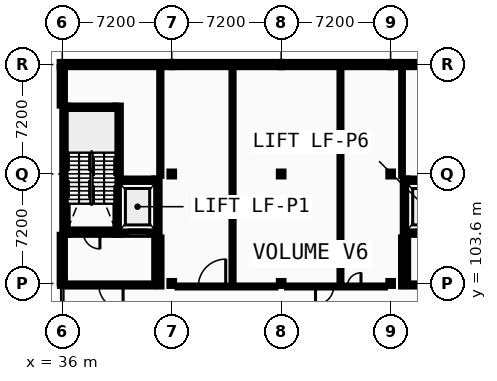
"""IFC4 building model, lengths in metres.
Left out: names, types, materials, properties, quantities, classifications, styles, units other than length and angle.
Written with IfcOpenShell. Run it as: python <this file> out.ifc"""

import sys

from ifc_helpers import new_model, si_unit, direction, frame, frame_2d, origin, origin_2d, place, context, subcontext, project, spatial, rectangle, i_section, extrude, element, fill, save


model = new_model("IFC4")
c1 = context("Model", 3, precision=1e-05, world=origin(), true_north=direction((0.0, 1.0)))
c2 = subcontext(c1, "Body", "Model", "MODEL_VIEW")
j1 = project(units=[si_unit("LENGTHUNIT", "METRE"), si_unit("PLANEANGLEUNIT", "RADIAN")], contexts=[c1])
p1 = place(None, origin())
s1 = spatial("IfcSite", under=j1, at=p1, CompositionType="ELEMENT")
p2 = place(p1, origin())
s2 = spatial("IfcBuilding", under=s1, at=p2, CompositionType="ELEMENT")
p3 = place(p2, frame((0.0, 0.0, 18.4)))
s3 = spatial("IfcBuildingStorey", under=s2, at=p3, CompositionType="ELEMENT", Elevation=18.4)
for number, where, z_axis, x_axis in (
    (1, (36.0, 103.6, 0.0), (0.0, 0.0, 1.0), (1.0, 0.0, 0.0)),
    (2, (36.0, 118.0, 0.0), (0.0, 0.0, 1.0), (1.0, 0.0, 0.0)),
    (3, (43.2, 103.6, 0.0), (0.0, 0.0, 1.0), (1.0, 0.0, 0.0)),
    (4, (43.2, 110.8, 0.0), (0.0, 0.0, 1.0), (1.0, 0.0, 0.0)),
    (5, (43.2, 118.0, 0.0), (0.0, 0.0, 1.0), (1.0, 0.0, 0.0)),
    (6, (50.4, 103.6, 0.0), (0.0, 0.0, 1.0), (1.0, 0.0, 0.0)),
    (7, (50.4, 110.8, 0.0), (0.0, 0.0, 1.0), (1.0, 0.0, 0.0)),
    (8, (50.4, 118.0, 0.0), (0.0, 0.0, 1.0), (1.0, 0.0, 0.0)),
    (9, (57.6, 103.6, 0.0), (0.0, 0.0, 1.0), (1.0, 0.0, 0.0)),
    (10, (57.6, 110.8, 0.0), (0.0, 0.0, 1.0), (1.0, 0.0, 0.0)),
    (11, (57.6, 118.0, 0.0), (0.0, 0.0, 1.0), (1.0, 0.0, 0.0)),
):
    element("IfcColumn", number, at=place(p3, frame(where, z_axis=z_axis, x_axis=x_axis)), inside=s3, PredefinedType="COLUMN", context=c2, shape_type="SweptSolid", body=[
        extrude(i_section(OverallWidth=0.3, OverallDepth=0.32, WebThickness=0.011, FlangeThickness=0.021, FilletRadius=0.027, at=origin_2d()), origin(), (0.0, 0.0, 1.0), 4.4),
    ])
p4 = place(p3, frame((43.2, 118.0, 0.0), z_axis=(0.0, 0.0, 1.0), x_axis=(-1.0, 0.0, 0.0)))
e12 = element("IfcWall", 12, at=p4, inside=s3, PredefinedType="STANDARD", context=c2, shape_type="SweptSolid", body=[
    extrude(rectangle(XDim=7.37, YDim=0.34, at=frame_2d((3.685, 0.0))), origin(), (0.0, 0.0, 1.0), 3.95),
])
p5 = place(p4, frame((1.662, 0.0, 0.95)))
e13 = element("IfcOpeningElement", 13, at=p5, cuts=e12, PredefinedType="OPENING", context=c2, shape_type="SweptSolid", body=[
    extrude(rectangle(XDim=1.098, YDim=1.26, at=frame_2d((0.549, 0.63))), frame((0.0, 0.18, 0.0), z_axis=(0.0, -1.0, 0.0), x_axis=(1.0, 0.0, 0.0)), (0.0, 0.0, 1.0), 0.36),
])
p6 = place(p4, frame((4.61, 0.0, 0.95)))
e14 = element("IfcOpeningElement", 14, at=p6, cuts=e12, PredefinedType="OPENING", context=c2, shape_type="SweptSolid", body=[
    extrude(rectangle(XDim=1.098, YDim=1.26, at=frame_2d((0.549, 0.63))), frame((0.0, 0.18, 0.0), z_axis=(0.0, -1.0, 0.0), x_axis=(1.0, 0.0, 0.0)), (0.0, 0.0, 1.0), 0.36),
])
p7 = place(p3, frame((50.4, 118.0, 0.0), z_axis=(0.0, 0.0, 1.0), x_axis=(-1.0, 0.0, 0.0)))
e15 = element("IfcWall", 15, at=p7, inside=s3, PredefinedType="STANDARD", context=c2, shape_type="SweptSolid", body=[
    extrude(rectangle(XDim=7.2, YDim=0.34, at=frame_2d((3.6, 0.0))), origin(), (0.0, 0.0, 1.0), 3.95),
])
p8 = place(p7, frame((1.594, 0.0, 0.95)))
e16 = element("IfcOpeningElement", 16, at=p8, cuts=e15, PredefinedType="OPENING", context=c2, shape_type="SweptSolid", body=[
    extrude(rectangle(XDim=1.132, YDim=1.26, at=frame_2d((0.566, 0.63))), frame((0.0, 0.18, 0.0), z_axis=(0.0, -1.0, 0.0), x_axis=(1.0, 0.0, 0.0)), (0.0, 0.0, 1.0), 0.36),
])
p9 = place(p3, frame((57.6, 118.0, 0.0), z_axis=(0.0, 0.0, 1.0), x_axis=(-1.0, 0.0, 0.0)))
e17 = element("IfcWall", 17, at=p9, inside=s3, PredefinedType="STANDARD", context=c2, shape_type="SweptSolid", body=[
    extrude(rectangle(XDim=7.2, YDim=0.34, at=frame_2d((3.6, 0.0))), origin(), (0.0, 0.0, 1.0), 3.95),
])
p10 = place(p9, frame((1.577, 0.0, 0.95)))
e18 = element("IfcOpeningElement", 18, at=p10, cuts=e17, PredefinedType="OPENING", context=c2, shape_type="SweptSolid", body=[
    extrude(rectangle(XDim=1.166, YDim=1.26, at=frame_2d((0.583, 0.63))), frame((0.0, 0.18, 0.0), z_axis=(0.0, -1.0, 0.0), x_axis=(1.0, 0.0, 0.0)), (0.0, 0.0, 1.0), 0.36),
])
p11 = place(p9, frame((4.457, 0.0, 0.95)))
e19 = element("IfcOpeningElement", 19, at=p11, cuts=e17, PredefinedType="OPENING", context=c2, shape_type="SweptSolid", body=[
    extrude(rectangle(XDim=1.166, YDim=1.26, at=frame_2d((0.583, 0.63))), frame((0.0, 0.18, 0.0), z_axis=(0.0, -1.0, 0.0), x_axis=(1.0, 0.0, 0.0)), (0.0, 0.0, 1.0), 0.36),
])
p12 = place(p3, frame((64.97, 118.0, 0.0), z_axis=(0.0, 0.0, 1.0), x_axis=(-1.0, 0.0, 0.0)))
e20 = element("IfcWall", 20, at=p12, inside=s3, PredefinedType="STANDARD", context=c2, shape_type="SweptSolid", body=[
    extrude(rectangle(XDim=7.37, YDim=0.34, at=frame_2d((3.685, 0.0))), origin(), (0.0, 0.0, 1.0), 3.95),
])
p13 = place(p12, frame((1.611, 0.0, 0.95)))
e21 = element("IfcOpeningElement", 21, at=p13, cuts=e20, PredefinedType="OPENING", context=c2, shape_type="SweptSolid", body=[
    extrude(rectangle(XDim=1.2, YDim=1.26, at=frame_2d((0.6, 0.63))), frame((0.0, 0.18, 0.0), z_axis=(0.0, -1.0, 0.0), x_axis=(1.0, 0.0, 0.0)), (0.0, 0.0, 1.0), 0.36),
])
p14 = place(p12, frame((4.559, 0.0, 0.95)))
e22 = element("IfcOpeningElement", 22, at=p14, cuts=e20, PredefinedType="OPENING", context=c2, shape_type="SweptSolid", body=[
    extrude(rectangle(XDim=1.2, YDim=1.26, at=frame_2d((0.6, 0.63))), frame((0.0, 0.18, 0.0), z_axis=(0.0, -1.0, 0.0), x_axis=(1.0, 0.0, 0.0)), (0.0, 0.0, 1.0), 0.36),
])
p15 = place(p3, frame((36.0, 106.8, 0.0), z_axis=(0.0, 0.0, 1.0), x_axis=(0.0, -1.0, 0.0)))
e23 = element("IfcWall", 23, at=p15, inside=s3, PredefinedType="STANDARD", context=c2, shape_type="SweptSolid", body=[
    extrude(rectangle(XDim=3.2, YDim=0.34, at=frame_2d((1.6, 0.0))), origin(), (0.0, 0.0, 1.0), 4.215),
])
p16 = place(p15, frame((0.983, 0.0, 0.95)))
e24 = element("IfcOpeningElement", 24, at=p16, cuts=e23, PredefinedType="OPENING", context=c2, shape_type="SweptSolid", body=[
    extrude(rectangle(XDim=1.234, YDim=1.26, at=frame_2d((0.617, 0.63))), frame((0.0, 0.18, 0.0), z_axis=(0.0, -1.0, 0.0), x_axis=(1.0, 0.0, 0.0)), (0.0, 0.0, 1.0), 0.36),
])
p17 = place(p3, frame((36.0, 117.83, 0.0), z_axis=(0.0, 0.0, 1.0), x_axis=(0.0, -1.0, 0.0)))
e25 = element("IfcWall", 25, at=p17, inside=s3, PredefinedType="STANDARD", context=c2, shape_type="SweptSolid", body=[
    extrude(rectangle(XDim=2.53, YDim=0.34, at=frame_2d((1.265, 0.0))), origin(), (0.0, 0.0, 1.0), 4.215),
])
p18 = place(p3, frame((36.35, 106.975, 0.0), z_axis=(0.0, 0.0, 1.0), x_axis=(1.0, 0.0, 0.0)))
e26 = element("IfcWall", 26, at=p18, inside=s3, PredefinedType="SHEAR", context=c2, shape_type="SweptSolid", body=[
    extrude(rectangle(XDim=3.15, YDim=0.35, at=frame_2d((1.575, 0.0))), origin(), (0.0, 0.0, 1.0), 4.215),
])
p19 = place(p18, frame((1.025, 0.0, 0.0)))
e27 = element("IfcOpeningElement", 27, at=p19, cuts=e26, PredefinedType="OPENING", context=c2, shape_type="SweptSolid", body=[
    extrude(rectangle(XDim=1.1, YDim=2.15, at=frame_2d((0.55, 1.075))), frame((0.0, 0.185, 0.0), z_axis=(0.0, -1.0, 0.0), x_axis=(1.0, 0.0, 0.0)), (0.0, 0.0, 1.0), 0.37),
])
p20 = place(p3, frame((36.35, 115.125, 0.0), z_axis=(0.0, 0.0, 1.0), x_axis=(1.0, 0.0, 0.0)))
e28 = element("IfcWall", 28, at=p20, inside=s3, PredefinedType="SHEAR", context=c2, shape_type="SweptSolid", body=[
    extrude(rectangle(XDim=3.15, YDim=0.35, at=frame_2d((1.575, 0.0))), origin(), (0.0, 0.0, 1.0), 4.215),
])
for number, where, z_axis, x_axis in (
    (29, (36.175, 106.8, 0.0), (0.0, 0.0, 1.0), (0.0, 1.0, 0.0)),
    (30, (39.675, 106.8, 0.0), (0.0, 0.0, 1.0), (0.0, 1.0, 0.0)),
):
    element("IfcWall", number, at=place(p3, frame(where, z_axis=z_axis, x_axis=x_axis)), inside=s3, PredefinedType="SHEAR", context=c2, shape_type="SweptSolid", body=[
        extrude(rectangle(XDim=8.5, YDim=0.35, at=frame_2d((4.25, 0.0))), origin(), (0.0, 0.0, 1.0), 4.215),
    ])
p21 = place(p3, frame((39.85, 106.975, 0.0), z_axis=(0.0, 0.0, 1.0), x_axis=(1.0, 0.0, 0.0)))
e31 = element("IfcWall", 31, at=p21, inside=s3, PredefinedType="SHEAR", context=c2, shape_type="SweptSolid", body=[
    extrude(rectangle(XDim=2.2, YDim=0.35, at=frame_2d((1.1, 0.0))), origin(), (0.0, 0.0, 1.0), 4.215),
])
p22 = place(p21, frame((0.5, 0.0, 0.0)))
e32 = element("IfcOpeningElement", 32, at=p22, cuts=e31, PredefinedType="OPENING", context=c2, shape_type="SweptSolid", body=[
    extrude(rectangle(XDim=1.2, YDim=2.2, at=frame_2d((0.6, 1.1))), frame((0.0, 0.185, 0.0), z_axis=(0.0, -1.0, 0.0), x_axis=(1.0, 0.0, 0.0)), (0.0, 0.0, 1.0), 0.37),
])
p23 = place(p3, frame((39.85, 110.325, 0.0), z_axis=(0.0, 0.0, 1.0), x_axis=(1.0, 0.0, 0.0)))
e33 = element("IfcWall", 33, at=p23, inside=s3, PredefinedType="SHEAR", context=c2, shape_type="SweptSolid", body=[
    extrude(rectangle(XDim=2.2, YDim=0.35, at=frame_2d((1.1, 0.0))), origin(), (0.0, 0.0, 1.0), 4.215),
])
p24 = place(p3, frame((42.225, 106.8, 0.0), z_axis=(0.0, 0.0, 1.0), x_axis=(0.0, 1.0, 0.0)))
e34 = element("IfcWall", 34, at=p24, inside=s3, PredefinedType="SHEAR", context=c2, shape_type="SweptSolid", body=[
    extrude(rectangle(XDim=3.7, YDim=0.35, at=frame_2d((1.85, 0.0))), origin(), (0.0, 0.0, 1.0), 4.215),
])
p25 = place(p3, frame((36.35, 103.5, 0.0), z_axis=(0.0, 0.0, 1.0), x_axis=(1.0, 0.0, 0.0)))
e35 = element("IfcWall", 35, at=p25, inside=s3, PredefinedType="PARTITIONING", context=c2, shape_type="SweptSolid", body=[
    extrude(rectangle(XDim=5.7, YDim=0.2, at=frame_2d((2.85, 0.0))), origin(), (0.0, 0.0, 1.0), 3.95),
])
p26 = place(p25, frame((2.05, 0.0, 0.0)))
e36 = element("IfcOpeningElement", 36, at=p26, cuts=e35, PredefinedType="OPENING", context=c2, shape_type="SweptSolid", body=[
    extrude(rectangle(XDim=1.6, YDim=2.2, at=frame_2d((0.8, 1.1))), frame((0.0, 0.11, 0.0), z_axis=(0.0, -1.0, 0.0), x_axis=(1.0, 0.0, 0.0)), (0.0, 0.0, 1.0), 0.22),
])
p27 = place(p3, frame((42.15, 103.6, 0.0), z_axis=(0.0, 0.0, 1.0), x_axis=(0.0, 1.0, 0.0)))
e37 = element("IfcWall", 37, at=p27, inside=s3, PredefinedType="PARTITIONING", context=c2, shape_type="SweptSolid", body=[
    extrude(rectangle(XDim=3.2, YDim=0.2, at=frame_2d((1.6, 0.0))), origin(), (0.0, 0.0, 1.0), 4.215),
])
p28 = place(p3, frame((58.75, 106.975, 0.0), z_axis=(0.0, 0.0, 1.0), x_axis=(1.0, 0.0, 0.0)))
e38 = element("IfcWall", 38, at=p28, inside=s3, PredefinedType="SHEAR", context=c2, shape_type="SweptSolid", body=[
    extrude(rectangle(XDim=2.2, YDim=0.35, at=frame_2d((1.1, 0.0))), origin(), (0.0, 0.0, 1.0), 4.215),
])
p29 = place(p28, frame((0.5, 0.0, 0.0)))
e39 = element("IfcOpeningElement", 39, at=p29, cuts=e38, PredefinedType="OPENING", context=c2, shape_type="SweptSolid", body=[
    extrude(rectangle(XDim=1.2, YDim=2.2, at=frame_2d((0.6, 1.1))), frame((0.0, 0.185, 0.0), z_axis=(0.0, -1.0, 0.0), x_axis=(1.0, 0.0, 0.0)), (0.0, 0.0, 1.0), 0.37),
])
p30 = place(p3, frame((58.75, 110.325, 0.0), z_axis=(0.0, 0.0, 1.0), x_axis=(1.0, 0.0, 0.0)))
e40 = element("IfcWall", 40, at=p30, inside=s3, PredefinedType="SHEAR", context=c2, shape_type="SweptSolid", body=[
    extrude(rectangle(XDim=2.2, YDim=0.35, at=frame_2d((1.1, 0.0))), origin(), (0.0, 0.0, 1.0), 4.215),
])
p31 = place(p3, frame((58.575, 106.8, 0.0), z_axis=(0.0, 0.0, 1.0), x_axis=(0.0, 1.0, 0.0)))
e41 = element("IfcWall", 41, at=p31, inside=s3, PredefinedType="SHEAR", context=c2, shape_type="SweptSolid", body=[
    extrude(rectangle(XDim=3.7, YDim=0.35, at=frame_2d((1.85, 0.0))), origin(), (0.0, 0.0, 1.0), 4.215),
])
p32 = place(p3, frame((58.75, 103.5, 0.0), z_axis=(0.0, 0.0, 1.0), x_axis=(1.0, 0.0, 0.0)))
e42 = element("IfcWall", 42, at=p32, inside=s3, PredefinedType="PARTITIONING", context=c2, shape_type="SweptSolid", body=[
    extrude(rectangle(XDim=5.7, YDim=0.2, at=frame_2d((2.85, 0.0))), origin(), (0.0, 0.0, 1.0), 3.95),
])
p33 = place(p32, frame((2.05, 0.0, 0.0)))
e43 = element("IfcOpeningElement", 43, at=p33, cuts=e42, PredefinedType="OPENING", context=c2, shape_type="SweptSolid", body=[
    extrude(rectangle(XDim=1.6, YDim=2.2, at=frame_2d((0.8, 1.1))), frame((0.0, 0.11, 0.0), z_axis=(0.0, -1.0, 0.0), x_axis=(1.0, 0.0, 0.0)), (0.0, 0.0, 1.0), 0.22),
])
p34 = place(p3, frame((58.65, 103.6, 0.0), z_axis=(0.0, 0.0, 1.0), x_axis=(0.0, 1.0, 0.0)))
e44 = element("IfcWall", 44, at=p34, inside=s3, PredefinedType="PARTITIONING", context=c2, shape_type="SweptSolid", body=[
    extrude(rectangle(XDim=3.2, YDim=0.2, at=frame_2d((1.6, 0.0))), origin(), (0.0, 0.0, 1.0), 4.215),
])
p35 = place(p3, frame((43.58, 103.4, 0.0), z_axis=(0.0, 0.0, 1.0), x_axis=(1.0, 0.0, 0.0)))
e45 = element("IfcWall", 45, at=p35, inside=s3, PredefinedType="PARTITIONING", context=c2, shape_type="SweptSolid", body=[
    extrude(rectangle(XDim=6.44, YDim=0.125, at=frame_2d((3.22, 0.0))), origin(), (0.0, 0.0, 1.0), 3.95),
])
p36 = place(p35, frame((1.37, 0.0, 0.0)))
e46 = element("IfcOpeningElement", 46, at=p36, cuts=e45, PredefinedType="OPENING", context=c2, shape_type="SweptSolid", body=[
    extrude(rectangle(XDim=1.8, YDim=2.3, at=frame_2d((0.9, 1.15))), frame((0.0, 0.073, 0.0), z_axis=(0.0, -1.0, 0.0), x_axis=(1.0, 0.0, 0.0)), (0.0, 0.0, 1.0), 0.145),
])
p37 = place(p3, frame((50.78, 103.4, 0.0), z_axis=(0.0, 0.0, 1.0), x_axis=(1.0, 0.0, 0.0)))
e47 = element("IfcWall", 47, at=p37, inside=s3, PredefinedType="PARTITIONING", context=c2, shape_type="SweptSolid", body=[
    extrude(rectangle(XDim=6.44, YDim=0.125, at=frame_2d((3.22, 0.0))), origin(), (0.0, 0.0, 1.0), 3.95),
])
p38 = place(p37, frame((3.97, 0.0, 0.0)))
e48 = element("IfcOpeningElement", 48, at=p38, cuts=e47, PredefinedType="OPENING", context=c2, shape_type="SweptSolid", body=[
    extrude(rectangle(XDim=0.9, YDim=2.1, at=frame_2d((0.45, 1.05))), frame((0.0, 0.073, 0.0), z_axis=(0.0, -1.0, 0.0), x_axis=(1.0, 0.0, 0.0)), (0.0, 0.0, 1.0), 0.145),
])
p39 = place(p37, frame((1.878, 0.0, 0.0)))
e49 = element("IfcOpeningElement", 49, at=p39, cuts=e47, PredefinedType="OPENING", context=c2, shape_type="SweptSolid", body=[
    extrude(rectangle(XDim=1.192, YDim=2.068, at=frame_2d((0.596, 1.034))), frame((0.0, 0.073, 0.0), z_axis=(0.0, -1.0, 0.0), x_axis=(1.0, 0.0, 0.0)), (0.0, 0.0, 1.0), 0.145),
])
p40 = place(p3, frame((42.45, 103.4, 0.0), z_axis=(0.0, 0.0, 1.0), x_axis=(0.0, 1.0, 0.0)))
e50 = element("IfcWall", 50, at=p40, inside=s3, PredefinedType="PARTITIONING", context=c2, shape_type="SweptSolid", body=[
    extrude(rectangle(XDim=3.225, YDim=0.15, at=frame_2d((1.613, 0.0))), origin(), (0.0, 0.0, 1.0), 4.215),
])
p41 = place(p3, frame((42.45, 110.675, 0.0), z_axis=(0.0, 0.0, 1.0), x_axis=(0.0, 1.0, 0.0)))
e51 = element("IfcWall", 51, at=p41, inside=s3, PredefinedType="PARTITIONING", context=c2, shape_type="SweptSolid", body=[
    extrude(rectangle(XDim=7.125, YDim=0.142, at=frame_2d((3.562, 0.0))), origin(), (0.0, 0.0, 1.0), 4.215),
])
p42 = place(p3, frame((47.2, 103.462, 0.0), z_axis=(0.0, 0.0, 1.0), x_axis=(0.0, 1.0, 0.0)))
e52 = element("IfcWall", 52, at=p42, inside=s3, PredefinedType="PARTITIONING", context=c2, shape_type="SweptSolid", body=[
    extrude(rectangle(XDim=14.338, YDim=0.135, at=frame_2d((7.169, 0.0))), origin(), (0.0, 0.0, 1.0), 4.215),
])
p43 = place(p3, frame((54.3, 103.462, 0.0), z_axis=(0.0, 0.0, 1.0), x_axis=(0.0, 1.0, 0.0)))
e53 = element("IfcWall", 53, at=p43, inside=s3, PredefinedType="PARTITIONING", context=c2, shape_type="SweptSolid", body=[
    extrude(rectangle(XDim=14.338, YDim=0.125, at=frame_2d((7.169, 0.0))), origin(), (0.0, 0.0, 1.0), 4.215),
])
p44 = place(p3, frame((58.35, 103.4, 0.0), z_axis=(0.0, 0.0, 1.0), x_axis=(0.0, 1.0, 0.0)))
e54 = element("IfcWall", 54, at=p44, inside=s3, PredefinedType="PARTITIONING", context=c2, shape_type="SweptSolid", body=[
    extrude(rectangle(XDim=3.225, YDim=0.125, at=frame_2d((1.613, 0.0))), origin(), (0.0, 0.0, 1.0), 4.215),
])
p45 = place(p3, frame((58.35, 110.675, 0.0), z_axis=(0.0, 0.0, 1.0), x_axis=(0.0, 1.0, 0.0)))
e55 = element("IfcWall", 55, at=p45, inside=s3, PredefinedType="PARTITIONING", context=c2, shape_type="SweptSolid", body=[
    extrude(rectangle(XDim=7.125, YDim=0.11, at=frame_2d((3.562, 0.0))), origin(), (0.0, 0.0, 1.0), 4.215),
])
p46 = place(p5, origin())
e56 = element("IfcWindow", 56, at=p46, inside=s3, PartitioningType="SINGLE_PANEL", PredefinedType="WINDOW", context=c2, shape_type="SweptSolid", body=[
    extrude(rectangle(XDim=1.098, YDim=1.26, at=frame_2d((0.549, 0.63))), frame((0.0, 0.03, 0.0), z_axis=(0.0, -1.0, 0.0), x_axis=(1.0, 0.0, 0.0)), (0.0, 0.0, 1.0), 0.06),
])
fill(e13, e56)
p47 = place(p6, origin())
e57 = element("IfcWindow", 57, at=p47, inside=s3, PartitioningType="SINGLE_PANEL", PredefinedType="WINDOW", context=c2, shape_type="SweptSolid", body=[
    extrude(rectangle(XDim=1.098, YDim=1.26, at=frame_2d((0.549, 0.63))), frame((0.0, 0.03, 0.0), z_axis=(0.0, -1.0, 0.0), x_axis=(1.0, 0.0, 0.0)), (0.0, 0.0, 1.0), 0.06),
])
fill(e14, e57)
p48 = place(p8, origin())
e58 = element("IfcWindow", 58, at=p48, inside=s3, PartitioningType="SINGLE_PANEL", PredefinedType="WINDOW", context=c2, shape_type="SweptSolid", body=[
    extrude(rectangle(XDim=1.132, YDim=1.26, at=frame_2d((0.566, 0.63))), frame((0.0, 0.03, 0.0), z_axis=(0.0, -1.0, 0.0), x_axis=(1.0, 0.0, 0.0)), (0.0, 0.0, 1.0), 0.06),
])
fill(e16, e58)
p49 = place(p10, origin())
e59 = element("IfcWindow", 59, at=p49, inside=s3, PartitioningType="SINGLE_PANEL", PredefinedType="WINDOW", context=c2, shape_type="SweptSolid", body=[
    extrude(rectangle(XDim=1.166, YDim=1.26, at=frame_2d((0.583, 0.63))), frame((0.0, 0.03, 0.0), z_axis=(0.0, -1.0, 0.0), x_axis=(1.0, 0.0, 0.0)), (0.0, 0.0, 1.0), 0.06),
])
fill(e18, e59)
p50 = place(p11, origin())
e60 = element("IfcWindow", 60, at=p50, inside=s3, PartitioningType="SINGLE_PANEL", PredefinedType="WINDOW", context=c2, shape_type="SweptSolid", body=[
    extrude(rectangle(XDim=1.166, YDim=1.26, at=frame_2d((0.583, 0.63))), frame((0.0, 0.03, 0.0), z_axis=(0.0, -1.0, 0.0), x_axis=(1.0, 0.0, 0.0)), (0.0, 0.0, 1.0), 0.06),
])
fill(e19, e60)
p51 = place(p14, origin())
e61 = element("IfcWindow", 61, at=p51, inside=s3, PartitioningType="SINGLE_PANEL", PredefinedType="WINDOW", context=c2, shape_type="SweptSolid", body=[
    extrude(rectangle(XDim=1.2, YDim=1.26, at=frame_2d((0.6, 0.63))), frame((0.0, 0.03, 0.0), z_axis=(0.0, -1.0, 0.0), x_axis=(1.0, 0.0, 0.0)), (0.0, 0.0, 1.0), 0.06),
])
fill(e22, e61)
p52 = place(p16, origin())
e62 = element("IfcWindow", 62, at=p52, inside=s3, PartitioningType="SINGLE_PANEL", PredefinedType="WINDOW", context=c2, shape_type="SweptSolid", body=[
    extrude(rectangle(XDim=1.234, YDim=1.26, at=frame_2d((0.617, 0.63))), frame((0.0, 0.03, 0.0), z_axis=(0.0, -1.0, 0.0), x_axis=(1.0, 0.0, 0.0)), (0.0, 0.0, 1.0), 0.06),
])
fill(e24, e62)
p53 = place(p19, origin())
e63 = element("IfcDoor", 63, at=p53, inside=s3, OperationType="SINGLE_SWING_RIGHT", PredefinedType="DOOR", context=c2, shape_type="SweptSolid", body=[
    extrude(rectangle(XDim=1.1, YDim=2.15, at=frame_2d((0.55, 1.075))), frame((0.0, 0.025, 0.0), z_axis=(0.0, -1.0, 0.0), x_axis=(1.0, 0.0, 0.0)), (0.0, 0.0, 1.0), 0.05),
])
fill(e27, e63)
p54 = place(p22, origin())
e64 = element("IfcDoor", 64, at=p54, inside=s3, OperationType="SLIDING_TO_RIGHT", PredefinedType="DOOR", context=c2, shape_type="SweptSolid", body=[
    extrude(rectangle(XDim=1.2, YDim=2.2, at=frame_2d((0.6, 1.1))), frame((0.0, 0.025, 0.0), z_axis=(0.0, -1.0, 0.0), x_axis=(1.0, 0.0, 0.0)), (0.0, 0.0, 1.0), 0.05),
])
fill(e32, e64)
p55 = place(p26, origin())
e65 = element("IfcDoor", 65, at=p55, inside=s3, OperationType="DOUBLE_DOOR_SINGLE_SWING", PredefinedType="DOOR", context=c2, shape_type="SweptSolid", body=[
    extrude(rectangle(XDim=1.6, YDim=2.2, at=frame_2d((0.8, 1.1))), frame((0.0, 0.025, 0.0), z_axis=(0.0, -1.0, 0.0), x_axis=(1.0, 0.0, 0.0)), (0.0, 0.0, 1.0), 0.05),
])
fill(e36, e65)
p56 = place(p29, origin())
e66 = element("IfcDoor", 66, at=p56, inside=s3, OperationType="SLIDING_TO_RIGHT", PredefinedType="DOOR", context=c2, shape_type="SweptSolid", body=[
    extrude(rectangle(XDim=1.2, YDim=2.2, at=frame_2d((0.6, 1.1))), frame((0.0, 0.025, 0.0), z_axis=(0.0, -1.0, 0.0), x_axis=(1.0, 0.0, 0.0)), (0.0, 0.0, 1.0), 0.05),
])
fill(e39, e66)
p57 = place(p38, frame((0.9, 0.0, 0.0), z_axis=(0.0, 0.0, 1.0), x_axis=(-1.0, 0.0, 0.0)))
e67 = element("IfcDoor", 67, at=p57, inside=s3, OperationType="SINGLE_SWING_RIGHT", PredefinedType="DOOR", context=c2, shape_type="SweptSolid", body=[
    extrude(rectangle(XDim=0.9, YDim=2.1, at=frame_2d((0.45, 1.05))), frame((0.0, 0.025, 0.0), z_axis=(0.0, -1.0, 0.0), x_axis=(1.0, 0.0, 0.0)), (0.0, 0.0, 1.0), 0.05),
])
fill(e48, e67)
p58 = place(p36, frame((1.8, 0.0, 0.0), z_axis=(0.0, 0.0, 1.0), x_axis=(-1.0, 0.0, 0.0)))
e68 = element("IfcDoor", 68, at=p58, inside=s3, OperationType="DOUBLE_DOOR_SINGLE_SWING", PredefinedType="DOOR", context=c2, shape_type="SweptSolid", body=[
    extrude(rectangle(XDim=1.8, YDim=2.3, at=frame_2d((0.9, 1.15))), frame((0.0, 0.025, 0.0), z_axis=(0.0, -1.0, 0.0), x_axis=(1.0, 0.0, 0.0)), (0.0, 0.0, 1.0), 0.05),
])
fill(e46, e68)
p59 = place(p39, frame((1.192, 0.0, 0.0), z_axis=(0.0, 0.0, 1.0), x_axis=(-1.0, 0.0, 0.0)))
e69 = element("IfcDoor", 69, at=p59, inside=s3, OperationType="SINGLE_SWING_LEFT", PredefinedType="DOOR", context=c2, shape_type="SweptSolid", body=[
    extrude(rectangle(XDim=1.192, YDim=2.068, at=frame_2d((0.596, 1.034))), frame((0.0, 0.025, 0.0), z_axis=(0.0, -1.0, 0.0), x_axis=(1.0, 0.0, 0.0)), (0.0, 0.0, 1.0), 0.05),
])
fill(e49, e69)
save(model, sys.argv[1])
